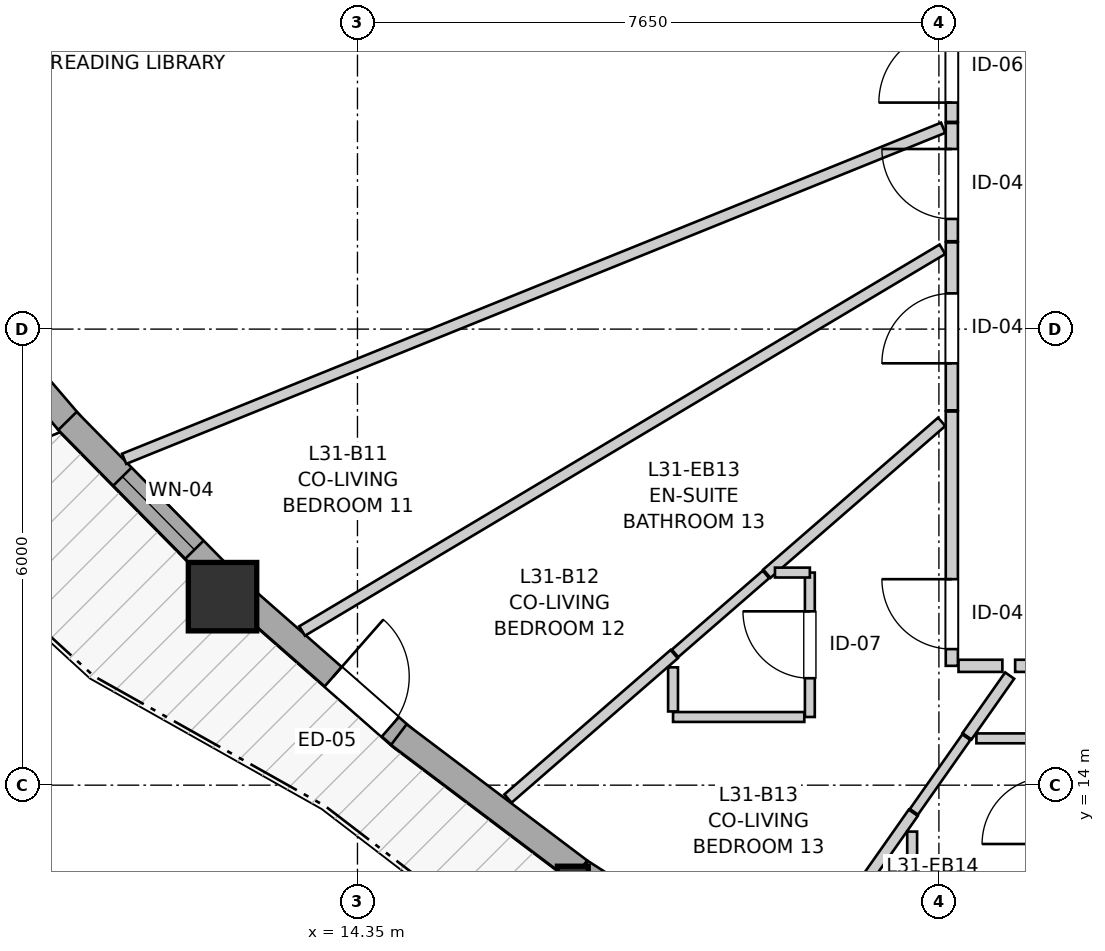
"""IFC4 building model, lengths in metres.
Left out: names, types, materials, properties, quantities, classifications, styles, units other than length and angle.
Written with IfcOpenShell. Run it as: python <this file> out.ifc"""

import sys

from ifc_helpers import new_model, si_unit, direction, frame, frame_2d, origin, origin_2d, place, context, subcontext, project, spatial, rectangle, i_section, extrude, source, transform, mapped, element, fill, save


model = new_model("IFC4")
c1 = context("Model", 3, precision=1e-05, world=origin(), true_north=direction((0.0, 1.0)))
c2 = subcontext(c1, "Body", "Model", "MODEL_VIEW")
j1 = project(units=[si_unit("LENGTHUNIT", "METRE"), si_unit("PLANEANGLEUNIT", "RADIAN")], contexts=[c1])
p1 = place(None, origin())
s1 = spatial("IfcSite", under=j1, at=p1, CompositionType="ELEMENT")
p2 = place(p1, origin())
s2 = spatial("IfcBuilding", under=s1, at=p2, CompositionType="ELEMENT")
p3 = place(p2, frame((0.0, 0.0, 105.6)))
s3 = spatial("IfcBuildingStorey", under=s2, at=p3, CompositionType="ELEMENT", Elevation=105.6)
m1 = source(origin(), c2, "Body", "SweptSolid", [
    extrude(rectangle(XDim=0.9, YDim=0.9, at=origin_2d()), origin(), (0.0, 0.0, 1.0), 2.935),
])
p4 = place(p3, frame((12.575, 16.48, 0.0), z_axis=(0.0, 0.0, 1.0), x_axis=(1.0, 0.0, 0.0)))
e1 = element("IfcColumn", 1, at=p4, inside=s3, PredefinedType="COLUMN", context=c2, shape_type="MappedRepresentation", body=[
    mapped(m1, transform((0.0, 0.0, 0.0), x_axis=(1.0, 0.0, 0.0), y_axis=(0.0, 1.0, 0.0), z_axis=(0.0, 0.0, 1.0), scale=1.0)),
])
m2 = source(origin(), c2, "Body", "SweptSolid", [
    extrude(i_section(OverallWidth=0.406, OverallDepth=0.416, WebThickness=0.027, FlangeThickness=0.044, FilletRadius=0.015, at=origin_2d()), origin(), (0.0, 0.0, 1.0), 2.935),
])
p5 = place(p3, frame((17.184, 12.726, 0.0), z_axis=(0.0, 0.0, 1.0), x_axis=(1.0, 0.0, 0.0)))
e2 = element("IfcColumn", 2, at=p5, inside=s3, PredefinedType="PILASTER", context=c2, shape_type="MappedRepresentation", body=[
    mapped(m2, transform((0.0, 0.0, 0.0), x_axis=(1.0, 0.0, 0.0), y_axis=(0.0, 1.0, 0.0), z_axis=(0.0, 0.0, 1.0), scale=1.0)),
])
p6 = place(p3, frame((8.562, 21.099, 0.0), z_axis=(0.0, 0.0, 1.0), x_axis=(0.650778499588, -0.75926763692, 0.0)))
e3 = element("IfcWall", 3, at=p6, inside=s3, PredefinedType="SOLIDWALL", context=c2, shape_type="SweptSolid", body=[
    extrude(rectangle(XDim=3.124, YDim=0.34, at=frame_2d((1.562, 0.0))), origin(), (0.0, 0.0, 1.0), 2.465),
])
p7 = place(p6, frame((0.727, 0.0, 0.82)))
e4 = element("IfcOpeningElement", 4, at=p7, cuts=e3, PredefinedType="OPENING", context=c2, shape_type="SweptSolid", body=[
    extrude(rectangle(XDim=1.65, YDim=1.45, at=frame_2d((0.825, 0.725))), frame((0.0, 0.18, 0.0), z_axis=(0.0, -1.0, 0.0), x_axis=(1.0, 0.0, 0.0)), (0.0, 0.0, 1.0), 0.36),
])
p8 = place(p3, frame((10.535, 18.792, 0.0), z_axis=(0.0, 0.0, 1.0), x_axis=(0.701902141766, -0.7122733909, 0.0)))
e5 = element("IfcWall", 5, at=p8, inside=s3, PredefinedType="SOLIDWALL", context=c2, shape_type="SweptSolid", body=[
    extrude(rectangle(XDim=2.848, YDim=0.34, at=frame_2d((1.424, 0.0))), origin(), (0.0, 0.0, 1.0), 2.465),
])
p9 = place(p8, frame((1.029, 0.0, 0.82)))
e6 = element("IfcOpeningElement", 6, at=p9, cuts=e5, PredefinedType="OPENING", context=c2, shape_type="SweptSolid", body=[
    extrude(rectangle(XDim=1.35, YDim=1.45, at=frame_2d((0.675, 0.725))), frame((0.0, 0.18, 0.0), z_axis=(0.0, -1.0, 0.0), x_axis=(1.0, 0.0, 0.0)), (0.0, 0.0, 1.0), 0.36),
])
p10 = place(p3, frame((12.86, 16.456, 0.0), z_axis=(0.0, 0.0, 1.0), x_axis=(0.751500349331, -0.659732692047, 0.0)))
e7 = element("IfcWall", 7, at=p10, inside=s3, PredefinedType="SOLIDWALL", context=c2, shape_type="SweptSolid", body=[
    extrude(rectangle(XDim=2.799, YDim=0.34, at=frame_2d((1.399, 0.0))), origin(), (0.0, 0.0, 1.0), 2.465),
])
p11 = place(p10, frame((1.559, 0.0, 0.0)))
e8 = element("IfcOpeningElement", 8, at=p11, cuts=e7, PredefinedType="OPENING", context=c2, shape_type="SweptSolid", body=[
    extrude(rectangle(XDim=1.0, YDim=2.1, at=frame_2d((0.5, 1.05))), frame((0.0, 0.18, 0.0), z_axis=(0.0, -1.0, 0.0), x_axis=(1.0, 0.0, 0.0)), (0.0, 0.0, 1.0), 0.36),
])
p12 = place(p3, frame((14.894, 14.665, 0.0), z_axis=(0.0, 0.0, 1.0), x_axis=(0.798431756537, -0.602085318001, 0.0)))
e9 = element("IfcWall", 9, at=p12, inside=s3, PredefinedType="SOLIDWALL", context=c2, shape_type="SweptSolid", body=[
    extrude(rectangle(XDim=2.976, YDim=0.34, at=frame_2d((1.488, 0.0))), origin(), (0.0, 0.0, 1.0), 2.465),
])
p13 = place(p3, frame((17.292, 12.858, 0.0), z_axis=(0.0, 0.0, 1.0), x_axis=(0.841524200167, -0.540219418878, 0.0)))
e10 = element("IfcWall", 10, at=p13, inside=s3, PredefinedType="SOLIDWALL", context=c2, shape_type="SweptSolid", body=[
    extrude(rectangle(XDim=2.958, YDim=0.34, at=frame_2d((1.479, 0.0))), origin(), (0.0, 0.0, 1.0), 2.465),
])
p14 = place(p13, frame((0.944, 0.0, 0.82)))
e11 = element("IfcOpeningElement", 11, at=p14, cuts=e10, PredefinedType="OPENING", context=c2, shape_type="SweptSolid", body=[
    extrude(rectangle(XDim=1.05, YDim=1.45, at=frame_2d((0.525, 0.725))), frame((0.0, 0.18, 0.0), z_axis=(0.0, -1.0, 0.0), x_axis=(1.0, 0.0, 0.0)), (0.0, 0.0, 1.0), 0.36),
])
p15 = place(p3, frame((26.473, 15.57, 0.0), z_axis=(0.0, 0.0, 1.0), x_axis=(-1.0, 0.0, 0.0)))
e12 = element("IfcWall", 12, at=p15, inside=s3, PredefinedType="PARTITIONING", context=c2, shape_type="SweptSolid", body=[
    extrude(rectangle(XDim=3.47, YDim=0.16, at=frame_2d((1.735, 0.0))), origin(), (0.0, 0.0, 1.0), 2.935),
])
p16 = place(p15, frame((1.274, 0.0, 0.0)))
e13 = element("IfcOpeningElement", 13, at=p16, cuts=e12, PredefinedType="OPENING", context=c2, shape_type="SweptSolid", body=[
    extrude(rectangle(XDim=0.92, YDim=2.1, at=frame_2d((0.46, 1.05))), frame((0.0, 0.09, 0.0), z_axis=(0.0, -1.0, 0.0), x_axis=(1.0, 0.0, 0.0)), (0.0, 0.0, 1.0), 0.18),
])
p17 = place(p3, frame((22.17, 15.57, 0.0), z_axis=(0.0, 0.0, 1.0), x_axis=(0.0, 1.0, 0.0)))
e14 = element("IfcWall", 14, at=p17, inside=s3, PredefinedType="PARTITIONING", context=c2, shape_type="SweptSolid", body=[
    extrude(rectangle(XDim=3.346, YDim=0.16, at=frame_2d((1.673, 0.0))), origin(), (0.0, 0.0, 1.0), 2.935),
])
p18 = place(p17, frame((0.22, 0.0, 0.0)))
e15 = element("IfcOpeningElement", 15, at=p18, cuts=e14, PredefinedType="OPENING", context=c2, shape_type="SweptSolid", body=[
    extrude(rectangle(XDim=0.92, YDim=2.1, at=frame_2d((0.46, 1.05))), frame((0.0, 0.09, 0.0), z_axis=(0.0, -1.0, 0.0), x_axis=(1.0, 0.0, 0.0)), (0.0, 0.0, 1.0), 0.18),
])
p19 = place(p3, frame((22.17, 18.931, 0.0), z_axis=(0.0, 0.0, 1.0), x_axis=(0.0, 1.0, 0.0)))
e16 = element("IfcWall", 16, at=p19, inside=s3, PredefinedType="PARTITIONING", context=c2, shape_type="SweptSolid", body=[
    extrude(rectangle(XDim=2.21, YDim=0.16, at=frame_2d((1.105, 0.0))), origin(), (0.0, 0.0, 1.0), 2.935),
])
p20 = place(p19, frame((0.619, 0.0, 0.0)))
e17 = element("IfcOpeningElement", 17, at=p20, cuts=e16, PredefinedType="OPENING", context=c2, shape_type="SweptSolid", body=[
    extrude(rectangle(XDim=0.92, YDim=2.1, at=frame_2d((0.46, 1.05))), frame((0.0, 0.09, 0.0), z_axis=(0.0, -1.0, 0.0), x_axis=(1.0, 0.0, 0.0)), (0.0, 0.0, 1.0), 0.18),
])
p21 = place(p3, frame((20.302, 14.897, 0.0), z_axis=(0.0, 0.0, 1.0), x_axis=(0.0, 1.0, 0.0)))
e18 = element("IfcWall", 18, at=p21, inside=s3, PredefinedType="PARTITIONING", context=c2, shape_type="SweptSolid", body=[
    extrude(rectangle(XDim=1.9, YDim=0.13, at=frame_2d((0.95, 0.0))), origin(), (0.0, 0.0, 1.0), 2.935),
])
p22 = place(p21, frame((0.51, 0.0, 0.0)))
e19 = element("IfcOpeningElement", 19, at=p22, cuts=e18, PredefinedType="OPENING", context=c2, shape_type="SweptSolid", body=[
    extrude(rectangle(XDim=0.88, YDim=2.05, at=frame_2d((0.44, 1.025))), frame((0.0, 0.075, 0.0), z_axis=(0.0, -1.0, 0.0), x_axis=(1.0, 0.0, 0.0)), (0.0, 0.0, 1.0), 0.15),
])
p23 = place(p3, frame((22.17, 21.156, 0.0), z_axis=(0.0, 0.0, 1.0), x_axis=(0.0, 1.0, 0.0)))
e20 = element("IfcWall", 20, at=p23, inside=s3, PredefinedType="PARTITIONING", context=c2, shape_type="SweptSolid", body=[
    extrude(rectangle(XDim=1.555, YDim=0.16, at=frame_2d((0.777, 0.0))), origin(), (0.0, 0.0, 1.0), 2.935),
])
p24 = place(p23, frame((0.293, 0.0, 0.0)))
e21 = element("IfcOpeningElement", 21, at=p24, cuts=e20, PredefinedType="OPENING", context=c2, shape_type="SweptSolid", body=[
    extrude(rectangle(XDim=0.92, YDim=2.1, at=frame_2d((0.46, 1.05))), frame((0.0, 0.09, 0.0), z_axis=(0.0, -1.0, 0.0), x_axis=(1.0, 0.0, 0.0)), (0.0, 0.0, 1.0), 0.18),
])
p25 = place(p3, frame((22.17, 22.726, 0.0), z_axis=(0.0, 0.0, 1.0), x_axis=(0.0, 1.0, 0.0)))
e22 = element("IfcWall", 22, at=p25, inside=s3, PredefinedType="PARTITIONING", context=c2, shape_type="SweptSolid", body=[
    extrude(rectangle(XDim=1.424, YDim=0.16, at=frame_2d((0.712, 0.0))), origin(), (0.0, 0.0, 1.0), 2.935),
])
p26 = place(p25, frame((0.254, 0.0, 0.0)))
e23 = element("IfcOpeningElement", 23, at=p26, cuts=e22, PredefinedType="OPENING", context=c2, shape_type="SweptSolid", body=[
    extrude(rectangle(XDim=0.96, YDim=2.1, at=frame_2d((0.48, 1.05))), frame((0.0, 0.09, 0.0), z_axis=(0.0, -1.0, 0.0), x_axis=(1.0, 0.0, 0.0)), (0.0, 0.0, 1.0), 0.18),
])
p27 = place(p3, frame((11.28, 18.294, 0.0), z_axis=(0.0, 0.0, 1.0), x_axis=(0.927137862507, 0.374720407645, 0.0)))
e24 = element("IfcWall", 24, at=p27, inside=s3, PredefinedType="PARTITIONING", context=c2, shape_type="SweptSolid", body=[
    extrude(rectangle(XDim=11.622, YDim=0.145, at=frame_2d((5.811, 0.0))), origin(), (0.0, 0.0, 1.0), 2.935),
])
p28 = place(p3, frame((13.622, 16.028, 0.0), z_axis=(0.0, 0.0, 1.0), x_axis=(0.85896108151, 0.512040877716, 0.0)))
e25 = element("IfcWall", 25, at=p28, inside=s3, PredefinedType="PARTITIONING", context=c2, shape_type="SweptSolid", body=[
    extrude(rectangle(XDim=9.807, YDim=0.145, at=frame_2d((4.904, 0.0))), origin(), (0.0, 0.0, 1.0), 2.935),
])
p29 = place(p3, frame((19.736, 16.782, 0.0), z_axis=(0.0, 0.0, 1.0), x_axis=(0.754964216329, 0.655765988796, 0.0)))
e26 = element("IfcWall", 26, at=p29, inside=s3, PredefinedType="PARTITIONING", context=c2, shape_type="SweptSolid", body=[
    extrude(rectangle(XDim=3.047, YDim=0.145, at=frame_2d((1.523, 0.0))), origin(), (0.0, 0.0, 1.0), 2.935),
])
p30 = place(p3, frame((16.33, 13.824, 0.0), z_axis=(0.0, 0.0, 1.0), x_axis=(0.754843145593, 0.655905348013, 0.0)))
e27 = element("IfcWall", 27, at=p30, inside=s3, PredefinedType="PARTITIONING", context=c2, shape_type="SweptSolid", body=[
    extrude(rectangle(XDim=2.897, YDim=0.145, at=frame_2d((1.448, 0.0))), origin(), (0.0, 0.0, 1.0), 2.935),
])
p31 = place(p3, frame((20.044, 11.334, 0.0), z_axis=(0.0, 0.0, 1.0), x_axis=(0.575027113175, 0.818134352728, 0.0)))
e28 = element("IfcWall", 28, at=p31, inside=s3, PredefinedType="PARTITIONING", context=c2, shape_type="SweptSolid", body=[
    extrude(rectangle(XDim=2.815, YDim=0.145, at=frame_2d((1.407, 0.0))), origin(), (0.0, 0.0, 1.0), 2.935),
])
p32 = place(p3, frame((18.502, 14.897, 0.0), z_axis=(0.0, 0.0, 1.0), x_axis=(1.0, 0.0, 0.0)))
e29 = element("IfcWall", 29, at=p32, inside=s3, PredefinedType="PARTITIONING", context=c2, shape_type="SweptSolid", body=[
    extrude(rectangle(XDim=1.727, YDim=0.13, at=frame_2d((0.864, 0.0))), origin(), (0.0, 0.0, 1.0), 2.935),
])
p33 = place(p3, frame((18.528, 15.734, 0.0), z_axis=(0.0, 0.0, 1.0), x_axis=(0.755063236967, 0.655651971843, 0.0)))
e30 = element("IfcWall", 30, at=p33, inside=s3, PredefinedType="PARTITIONING", context=c2, shape_type="SweptSolid", body=[
    extrude(rectangle(XDim=1.584, YDim=0.13, at=frame_2d((0.792, 0.0))), origin(), (0.0, 0.0, 1.0), 2.935),
])
p34 = place(p3, frame((21.671, 13.649, 0.0), z_axis=(0.0, 0.0, 1.0), x_axis=(0.574868196693, 0.81824602439, 0.0)))
e31 = element("IfcWall", 31, at=p34, inside=s3, PredefinedType="PARTITIONING", context=c2, shape_type="SweptSolid", body=[
    extrude(rectangle(XDim=1.2, YDim=0.13, at=frame_2d((0.6, 0.0))), origin(), (0.0, 0.0, 1.0), 2.935),
])
p35 = place(p3, frame((22.37, 14.643, 0.0), z_axis=(0.0, 0.0, 1.0), x_axis=(0.575022445487, 0.818137633401, 0.0)))
e32 = element("IfcWall", 32, at=p35, inside=s3, PredefinedType="PARTITIONING", context=c2, shape_type="SweptSolid", body=[
    extrude(rectangle(XDim=0.976, YDim=0.145, at=frame_2d((0.488, 0.0))), origin(), (0.0, 0.0, 1.0), 2.935),
])
p36 = place(p3, frame((22.493, 14.616, 0.0), z_axis=(0.0, 0.0, 1.0), x_axis=(1.0, 0.0, 0.0)))
e33 = element("IfcWall", 33, at=p36, inside=s3, PredefinedType="PARTITIONING", context=c2, shape_type="SweptSolid", body=[
    extrude(rectangle(XDim=0.882, YDim=0.13, at=frame_2d((0.441, 0.0))), origin(), (0.0, 0.0, 1.0), 2.935),
])
p37 = place(p3, frame((21.648, 12.789, 0.0), z_axis=(0.0, 0.0, 1.0), x_axis=(0.0, 1.0, 0.0)))
e34 = element("IfcWall", 34, at=p37, inside=s3, PredefinedType="PARTITIONING", context=c2, shape_type="SweptSolid", body=[
    extrude(rectangle(XDim=0.6, YDim=0.13, at=frame_2d((0.3, 0.0))), origin(), (0.0, 0.0, 1.0), 2.935),
])
p38 = place(p3, frame((22.258, 15.57, 0.0), z_axis=(0.0, 0.0, 1.0), x_axis=(1.0, 0.0, 0.0)))
e35 = element("IfcWall", 35, at=p38, inside=s3, PredefinedType="PARTITIONING", context=c2, shape_type="SweptSolid", body=[
    extrude(rectangle(XDim=0.577, YDim=0.16, at=frame_2d((0.289, 0.0))), origin(), (0.0, 0.0, 1.0), 2.935),
])
p39 = place(p3, frame((18.502, 14.97, 0.0), z_axis=(0.0, 0.0, 1.0), x_axis=(0.0, 1.0, 0.0)))
e36 = element("IfcWall", 36, at=p39, inside=s3, PredefinedType="PARTITIONING", context=c2, shape_type="SweptSolid", body=[
    extrude(rectangle(XDim=0.581, YDim=0.13, at=frame_2d((0.29, 0.0))), origin(), (0.0, 0.0, 1.0), 2.935),
])
p40 = place(p3, frame((19.843, 16.797, 0.0), z_axis=(0.0, 0.0, 1.0), x_axis=(1.0, 0.0, 0.0)))
e37 = element("IfcWall", 37, at=p40, inside=s3, PredefinedType="PARTITIONING", context=c2, shape_type="SweptSolid", body=[
    extrude(rectangle(XDim=0.459, YDim=0.13, at=frame_2d((0.229, 0.0))), origin(), (0.0, 0.0, 1.0), 2.935),
])
m3 = source(origin(), c2, "Body", "SweptSolid", [
    extrude(rectangle(XDim=1.35, YDim=1.45, at=frame_2d((0.675, 0.725))), frame((0.0, 0.03, 0.0), z_axis=(0.0, -1.0, 0.0), x_axis=(1.0, 0.0, 0.0)), (0.0, 0.0, 1.0), 0.06),
])
p41 = place(p9, origin())
e38 = element("IfcWindow", 38, at=p41, inside=s3, PartitioningType="SINGLE_PANEL", PredefinedType="WINDOW", context=c2, shape_type="MappedRepresentation", body=[
    mapped(m3, transform((0.0, 0.0, 0.0), x_axis=(1.0, 0.0, 0.0), y_axis=(0.0, 1.0, 0.0), z_axis=(0.0, 0.0, 1.0), scale=1.0)),
])
fill(e6, e38)
m4 = source(origin(), c2, "Body", "SweptSolid", [
    extrude(rectangle(XDim=1.0, YDim=2.1, at=frame_2d((0.5, 1.05))), frame((0.0, 0.025, 0.0), z_axis=(0.0, -1.0, 0.0), x_axis=(1.0, 0.0, 0.0)), (0.0, 0.0, 1.0), 0.05),
])
p42 = place(p11, origin())
e39 = element("IfcDoor", 39, at=p42, inside=s3, OperationType="SINGLE_SWING_LEFT", PredefinedType="DOOR", context=c2, shape_type="MappedRepresentation", body=[
    mapped(m4, transform((0.0, 0.0, 0.0), x_axis=(1.0, 0.0, 0.0), y_axis=(0.0, 1.0, 0.0), z_axis=(0.0, 0.0, 1.0), scale=1.0)),
])
fill(e8, e39)
m5 = source(origin(), c2, "Body", "SweptSolid", [
    extrude(rectangle(XDim=0.92, YDim=2.1, at=frame_2d((0.46, 1.05))), frame((0.0, 0.025, 0.0), z_axis=(0.0, -1.0, 0.0), x_axis=(1.0, 0.0, 0.0)), (0.0, 0.0, 1.0), 0.05),
])
p43 = place(p18, origin())
e40 = element("IfcDoor", 40, at=p43, inside=s3, OperationType="SINGLE_SWING_RIGHT", PredefinedType="DOOR", context=c2, shape_type="MappedRepresentation", body=[
    mapped(m5, transform((0.0, 0.0, 0.0), x_axis=(1.0, 0.0, 0.0), y_axis=(0.0, 1.0, 0.0), z_axis=(0.0, 0.0, 1.0), scale=1.0)),
])
fill(e15, e40)
p44 = place(p20, origin())
e41 = element("IfcDoor", 41, at=p44, inside=s3, OperationType="SINGLE_SWING_LEFT", PredefinedType="DOOR", context=c2, shape_type="MappedRepresentation", body=[
    mapped(m5, transform((0.0, 0.0, 0.0), x_axis=(1.0, 0.0, 0.0), y_axis=(0.0, 1.0, 0.0), z_axis=(0.0, 0.0, 1.0), scale=1.0)),
])
fill(e17, e41)
m6 = source(origin(), c2, "Body", "SweptSolid", [
    extrude(rectangle(XDim=0.88, YDim=2.05, at=frame_2d((0.44, 1.025))), frame((0.0, 0.025, 0.0), z_axis=(0.0, -1.0, 0.0), x_axis=(1.0, 0.0, 0.0)), (0.0, 0.0, 1.0), 0.05),
])
p45 = place(p22, origin())
e42 = element("IfcDoor", 42, at=p45, inside=s3, OperationType="SINGLE_SWING_RIGHT", PredefinedType="DOOR", context=c2, shape_type="MappedRepresentation", body=[
    mapped(m6, transform((0.0, 0.0, 0.0), x_axis=(1.0, 0.0, 0.0), y_axis=(0.0, 1.0, 0.0), z_axis=(0.0, 0.0, 1.0), scale=1.0)),
])
fill(e19, e42)
p46 = place(p24, origin())
e43 = element("IfcDoor", 43, at=p46, inside=s3, OperationType="SINGLE_SWING_RIGHT", PredefinedType="DOOR", context=c2, shape_type="MappedRepresentation", body=[
    mapped(m5, transform((0.0, 0.0, 0.0), x_axis=(1.0, 0.0, 0.0), y_axis=(0.0, 1.0, 0.0), z_axis=(0.0, 0.0, 1.0), scale=1.0)),
])
fill(e21, e43)
m7 = source(origin(), c2, "Body", "SweptSolid", [
    extrude(rectangle(XDim=0.96, YDim=2.1, at=frame_2d((0.48, 1.05))), frame((0.0, 0.025, 0.0), z_axis=(0.0, -1.0, 0.0), x_axis=(1.0, 0.0, 0.0)), (0.0, 0.0, 1.0), 0.05),
])
p47 = place(p26, origin())
e44 = element("IfcDoor", 44, at=p47, inside=s3, OperationType="SINGLE_SWING_LEFT", PredefinedType="DOOR", context=c2, shape_type="MappedRepresentation", body=[
    mapped(m7, transform((0.0, 0.0, 0.0), x_axis=(1.0, 0.0, 0.0), y_axis=(0.0, 1.0, 0.0), z_axis=(0.0, 0.0, 1.0), scale=1.0)),
])
fill(e23, e44)
save(model, sys.argv[1])
